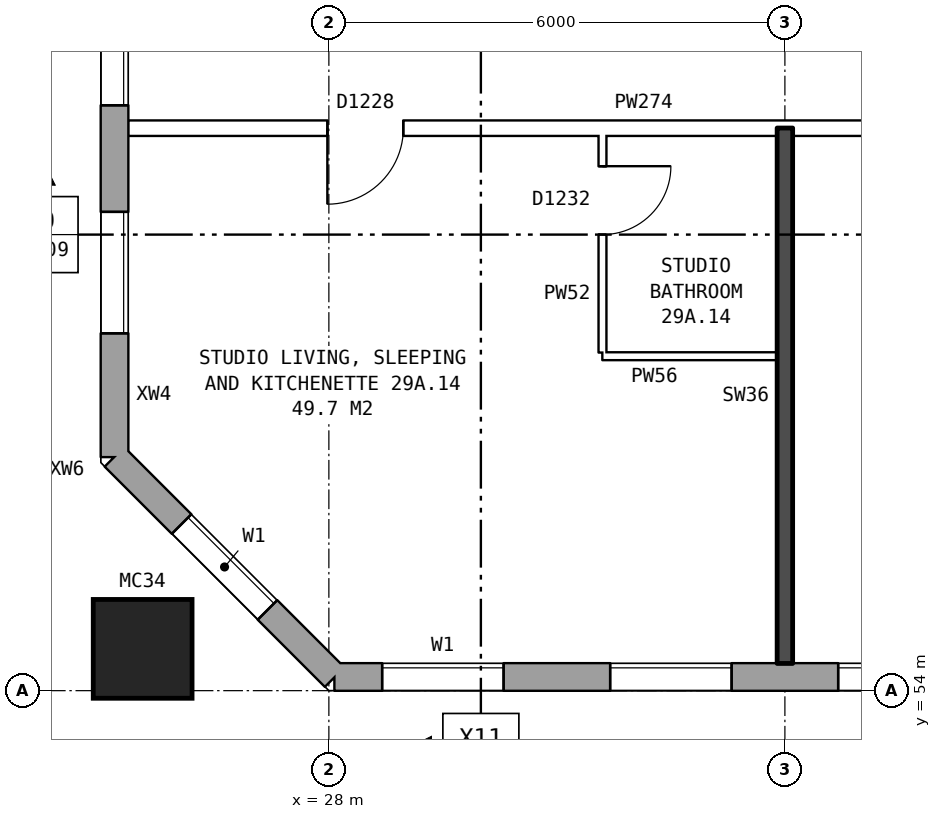
"""IFC4 building model, lengths in metres.
Left out: names, types, materials, properties, quantities, classifications, styles, units other than length and angle.
Written with IfcOpenShell. Run it as: python <this file> out.ifc"""

import sys

from ifc_helpers import new_model, si_unit, direction, frame, frame_2d, origin, origin_2d, place, context, subcontext, project, spatial, rectangle, hollow_rectangle, extrude, element, fill, save


model = new_model("IFC4")
c1 = context("Model", 3, precision=1e-05, world=origin(), true_north=direction((0.0, 1.0)))
c2 = subcontext(c1, "Body", "Model", "MODEL_VIEW")
j1 = project(units=[si_unit("LENGTHUNIT", "METRE"), si_unit("PLANEANGLEUNIT", "RADIAN")], contexts=[c1])
p1 = place(None, origin())
s1 = spatial("IfcSite", under=j1, at=p1, CompositionType="ELEMENT")
p2 = place(p1, origin())
s2 = spatial("IfcBuilding", under=s1, at=p2, CompositionType="ELEMENT")
p3 = place(p2, frame((0.0, 0.0, 105.7)))
s3 = spatial("IfcBuildingStorey", under=s2, at=p3, CompositionType="ELEMENT", Elevation=105.7)
p4 = place(p3, frame((25.55, 54.55, 0.0), z_axis=(0.0, 0.0, 1.0), x_axis=(1.0, 0.0, 0.0)))
e1 = element("IfcColumn", 1, at=p4, inside=s3, PredefinedType="COLUMN", context=c2, shape_type="SweptSolid", body=[
    extrude(hollow_rectangle(XDim=1.3, YDim=1.3, WallThickness=0.07, at=origin_2d()), origin(), (0.0, 0.0, 1.0), 3.1),
])
p5 = place(p3, frame((25.18, 57.075, 0.0), z_axis=(0.0, 0.0, 1.0), x_axis=(0.707106781187, -0.707106781187, 0.0)))
e2 = element("IfcWall", 2, at=p5, inside=s3, PredefinedType="STANDARD", context=c2, shape_type="SweptSolid", body=[
    extrude(rectangle(XDim=4.094, YDim=0.36, at=frame_2d((2.047, 0.0))), origin(), (0.0, 0.0, 1.0), 2.85),
])
p6 = place(p5, frame((1.247, 0.0, 0.8)))
e3 = element("IfcOpeningElement", 3, at=p6, cuts=e2, PredefinedType="OPENING", context=c2, shape_type="SweptSolid", body=[
    extrude(rectangle(XDim=1.6, YDim=1.8, at=frame_2d((0.8, 0.9))), frame((0.0, 0.19, 0.0), z_axis=(0.0, -1.0, 0.0), x_axis=(1.0, 0.0, 0.0)), (0.0, 0.0, 1.0), 0.38),
])
p7 = place(p3, frame((28.075, 54.18, 0.0), z_axis=(0.0, 0.0, 1.0), x_axis=(1.0, 0.0, 0.0)))
e4 = element("IfcWall", 4, at=p7, inside=s3, PredefinedType="STANDARD", context=c2, shape_type="SweptSolid", body=[
    extrude(rectangle(XDim=44.851, YDim=0.36, at=frame_2d((22.425, 0.0))), origin(), (0.0, 0.0, 1.0), 2.85),
])
p8 = place(p7, frame((0.625, 0.0, 0.8)))
e5 = element("IfcOpeningElement", 5, at=p8, cuts=e4, PredefinedType="OPENING", context=c2, shape_type="SweptSolid", body=[
    extrude(rectangle(XDim=1.6, YDim=1.8, at=frame_2d((0.8, 0.9))), frame((0.0, 0.19, 0.0), z_axis=(0.0, -1.0, 0.0), x_axis=(1.0, 0.0, 0.0)), (0.0, 0.0, 1.0), 0.38),
])
p9 = place(p7, frame((3.625, 0.0, 0.8)))
e6 = element("IfcOpeningElement", 6, at=p9, cuts=e4, PredefinedType="OPENING", context=c2, shape_type="SweptSolid", body=[
    extrude(rectangle(XDim=1.6, YDim=1.8, at=frame_2d((0.8, 0.9))), frame((0.0, 0.19, 0.0), z_axis=(0.0, -1.0, 0.0), x_axis=(1.0, 0.0, 0.0)), (0.0, 0.0, 1.0), 0.38),
])
p10 = place(p7, frame((6.625, 0.0, 0.8)))
e7 = element("IfcOpeningElement", 7, at=p10, cuts=e4, PredefinedType="OPENING", context=c2, shape_type="SweptSolid", body=[
    extrude(rectangle(XDim=1.6, YDim=1.8, at=frame_2d((0.8, 0.9))), frame((0.0, 0.19, 0.0), z_axis=(0.0, -1.0, 0.0), x_axis=(1.0, 0.0, 0.0)), (0.0, 0.0, 1.0), 0.38),
])
p11 = place(p7, frame((8.525, 0.0, 0.8)))
e8 = element("IfcOpeningElement", 8, at=p11, cuts=e4, PredefinedType="OPENING", context=c2, shape_type="SweptSolid", body=[
    extrude(rectangle(XDim=1.4, YDim=1.8, at=frame_2d((0.7, 0.9))), frame((0.0, 0.19, 0.0), z_axis=(0.0, -1.0, 0.0), x_axis=(1.0, 0.0, 0.0)), (0.0, 0.0, 1.0), 0.38),
])
p12 = place(p7, frame((13.175, 0.0, 0.8)))
e9 = element("IfcOpeningElement", 9, at=p12, cuts=e4, PredefinedType="OPENING", context=c2, shape_type="SweptSolid", body=[
    extrude(rectangle(XDim=1.0, YDim=0.9, at=frame_2d((0.5, 0.45))), frame((0.0, 0.19, 0.0), z_axis=(0.0, -1.0, 0.0), x_axis=(1.0, 0.0, 0.0)), (0.0, 0.0, 1.0), 0.38),
])
p13 = place(p7, frame((15.625, 0.0, 0.8)))
e10 = element("IfcOpeningElement", 10, at=p13, cuts=e4, PredefinedType="OPENING", context=c2, shape_type="SweptSolid", body=[
    extrude(rectangle(XDim=1.6, YDim=1.8, at=frame_2d((0.8, 0.9))), frame((0.0, 0.19, 0.0), z_axis=(0.0, -1.0, 0.0), x_axis=(1.0, 0.0, 0.0)), (0.0, 0.0, 1.0), 0.38),
])
p14 = place(p7, frame((18.625, 0.0, 0.8)))
e11 = element("IfcOpeningElement", 11, at=p14, cuts=e4, PredefinedType="OPENING", context=c2, shape_type="SweptSolid", body=[
    extrude(rectangle(XDim=1.6, YDim=1.8, at=frame_2d((0.8, 0.9))), frame((0.0, 0.19, 0.0), z_axis=(0.0, -1.0, 0.0), x_axis=(1.0, 0.0, 0.0)), (0.0, 0.0, 1.0), 0.38),
])
p15 = place(p7, frame((21.625, 0.0, 0.8)))
e12 = element("IfcOpeningElement", 12, at=p15, cuts=e4, PredefinedType="OPENING", context=c2, shape_type="SweptSolid", body=[
    extrude(rectangle(XDim=1.6, YDim=1.8, at=frame_2d((0.8, 0.9))), frame((0.0, 0.19, 0.0), z_axis=(0.0, -1.0, 0.0), x_axis=(1.0, 0.0, 0.0)), (0.0, 0.0, 1.0), 0.38),
])
p16 = place(p7, frame((24.625, 0.0, 0.8)))
e13 = element("IfcOpeningElement", 13, at=p16, cuts=e4, PredefinedType="OPENING", context=c2, shape_type="SweptSolid", body=[
    extrude(rectangle(XDim=1.6, YDim=1.8, at=frame_2d((0.8, 0.9))), frame((0.0, 0.19, 0.0), z_axis=(0.0, -1.0, 0.0), x_axis=(1.0, 0.0, 0.0)), (0.0, 0.0, 1.0), 0.38),
])
p17 = place(p7, frame((27.625, 0.0, 0.8)))
e14 = element("IfcOpeningElement", 14, at=p17, cuts=e4, PredefinedType="OPENING", context=c2, shape_type="SweptSolid", body=[
    extrude(rectangle(XDim=1.6, YDim=1.8, at=frame_2d((0.8, 0.9))), frame((0.0, 0.19, 0.0), z_axis=(0.0, -1.0, 0.0), x_axis=(1.0, 0.0, 0.0)), (0.0, 0.0, 1.0), 0.38),
])
p18 = place(p7, frame((30.125, 0.0, 0.15)))
e15 = element("IfcOpeningElement", 15, at=p18, cuts=e4, PredefinedType="OPENING", context=c2, shape_type="SweptSolid", body=[
    extrude(rectangle(XDim=1.2, YDim=1.8, at=frame_2d((0.6, 0.9))), frame((0.0, 0.19, 0.0), z_axis=(0.0, -1.0, 0.0), x_axis=(1.0, 0.0, 0.0)), (0.0, 0.0, 1.0), 0.38),
])
p19 = place(p7, frame((33.075, 0.0, 1.6)))
e16 = element("IfcOpeningElement", 16, at=p19, cuts=e4, PredefinedType="OPENING", context=c2, shape_type="SweptSolid", body=[
    extrude(rectangle(XDim=0.6, YDim=0.9, at=frame_2d((0.3, 0.45))), frame((0.0, 0.19, 0.0), z_axis=(0.0, -1.0, 0.0), x_axis=(1.0, 0.0, 0.0)), (0.0, 0.0, 1.0), 0.38),
])
p20 = place(p7, frame((36.625, 0.0, 0.8)))
e17 = element("IfcOpeningElement", 17, at=p20, cuts=e4, PredefinedType="OPENING", context=c2, shape_type="SweptSolid", body=[
    extrude(rectangle(XDim=1.6, YDim=1.8, at=frame_2d((0.8, 0.9))), frame((0.0, 0.19, 0.0), z_axis=(0.0, -1.0, 0.0), x_axis=(1.0, 0.0, 0.0)), (0.0, 0.0, 1.0), 0.38),
])
p21 = place(p7, frame((39.625, 0.0, 0.8)))
e18 = element("IfcOpeningElement", 18, at=p21, cuts=e4, PredefinedType="OPENING", context=c2, shape_type="SweptSolid", body=[
    extrude(rectangle(XDim=1.6, YDim=1.8, at=frame_2d((0.8, 0.9))), frame((0.0, 0.19, 0.0), z_axis=(0.0, -1.0, 0.0), x_axis=(1.0, 0.0, 0.0)), (0.0, 0.0, 1.0), 0.38),
])
p22 = place(p7, frame((42.625, 0.0, 0.8)))
e19 = element("IfcOpeningElement", 19, at=p22, cuts=e4, PredefinedType="OPENING", context=c2, shape_type="SweptSolid", body=[
    extrude(rectangle(XDim=1.6, YDim=1.8, at=frame_2d((0.8, 0.9))), frame((0.0, 0.19, 0.0), z_axis=(0.0, -1.0, 0.0), x_axis=(1.0, 0.0, 0.0)), (0.0, 0.0, 1.0), 0.38),
])
p23 = place(p7, frame((10.225, 0.0, 1.1)))
e20 = element("IfcOpeningElement", 20, at=p23, cuts=e4, PredefinedType="OPENING", context=c2, shape_type="SweptSolid", body=[
    extrude(rectangle(XDim=0.8, YDim=1.5, at=frame_2d((0.4, 0.75))), frame((0.0, 0.19, 0.0), z_axis=(0.0, -1.0, 0.0), x_axis=(1.0, 0.0, 0.0)), (0.0, 0.0, 1.0), 0.38),
])
p24 = place(p7, frame((14.475, 0.0, 0.8)))
e21 = element("IfcOpeningElement", 21, at=p24, cuts=e4, PredefinedType="OPENING", context=c2, shape_type="SweptSolid", body=[
    extrude(rectangle(XDim=0.8, YDim=1.8, at=frame_2d((0.4, 0.9))), frame((0.0, 0.19, 0.0), z_axis=(0.0, -1.0, 0.0), x_axis=(1.0, 0.0, 0.0)), (0.0, 0.0, 1.0), 0.38),
])
p25 = place(p7, frame((31.625, 0.0, 0.25)))
e22 = element("IfcOpeningElement", 22, at=p25, cuts=e4, PredefinedType="OPENING", context=c2, shape_type="SweptSolid", body=[
    extrude(rectangle(XDim=0.8, YDim=0.9, at=frame_2d((0.4, 0.45))), frame((0.0, 0.19, 0.0), z_axis=(0.0, -1.0, 0.0), x_axis=(1.0, 0.0, 0.0)), (0.0, 0.0, 1.0), 0.38),
])
p26 = place(p7, frame((34.125, 0.0, 0.8)))
e23 = element("IfcOpeningElement", 23, at=p26, cuts=e4, PredefinedType="OPENING", context=c2, shape_type="SweptSolid", body=[
    extrude(rectangle(XDim=1.6, YDim=1.8, at=frame_2d((0.8, 0.9))), frame((0.0, 0.19, 0.0), z_axis=(0.0, -1.0, 0.0), x_axis=(1.0, 0.0, 0.0)), (0.0, 0.0, 1.0), 0.38),
])
p27 = place(p3, frame((25.18, 82.925, 0.0), z_axis=(0.0, 0.0, 1.0), x_axis=(0.0, -1.0, 0.0)))
e24 = element("IfcWall", 24, at=p27, inside=s3, PredefinedType="STANDARD", context=c2, shape_type="SweptSolid", body=[
    extrude(rectangle(XDim=25.851, YDim=0.36, at=frame_2d((12.925, 0.0))), origin(), (0.0, 0.0, 1.0), 2.85),
])
p28 = place(p27, frame((1.625, 0.0, 0.8)))
e25 = element("IfcOpeningElement", 25, at=p28, cuts=e24, PredefinedType="OPENING", context=c2, shape_type="SweptSolid", body=[
    extrude(rectangle(XDim=1.6, YDim=1.8, at=frame_2d((0.8, 0.9))), frame((0.0, 0.19, 0.0), z_axis=(0.0, -1.0, 0.0), x_axis=(1.0, 0.0, 0.0)), (0.0, 0.0, 1.0), 0.38),
])
p29 = place(p27, frame((4.625, 0.0, 0.8)))
e26 = element("IfcOpeningElement", 26, at=p29, cuts=e24, PredefinedType="OPENING", context=c2, shape_type="SweptSolid", body=[
    extrude(rectangle(XDim=1.6, YDim=1.8, at=frame_2d((0.8, 0.9))), frame((0.0, 0.19, 0.0), z_axis=(0.0, -1.0, 0.0), x_axis=(1.0, 0.0, 0.0)), (0.0, 0.0, 1.0), 0.38),
])
p30 = place(p27, frame((6.525, 0.0, 0.8)))
e27 = element("IfcOpeningElement", 27, at=p30, cuts=e24, PredefinedType="OPENING", context=c2, shape_type="SweptSolid", body=[
    extrude(rectangle(XDim=1.6, YDim=1.5, at=frame_2d((0.8, 0.75))), frame((0.0, 0.19, 0.0), z_axis=(0.0, -1.0, 0.0), x_axis=(1.0, 0.0, 0.0)), (0.0, 0.0, 1.0), 0.38),
])
p31 = place(p27, frame((8.425, 0.0, 0.8)))
e28 = element("IfcOpeningElement", 28, at=p31, cuts=e24, PredefinedType="OPENING", context=c2, shape_type="SweptSolid", body=[
    extrude(rectangle(XDim=0.6, YDim=0.9, at=frame_2d((0.3, 0.45))), frame((0.0, 0.19, 0.0), z_axis=(0.0, -1.0, 0.0), x_axis=(1.0, 0.0, 0.0)), (0.0, 0.0, 1.0), 0.38),
])
p32 = place(p27, frame((10.275, 0.0, 1.7)))
e29 = element("IfcOpeningElement", 29, at=p32, cuts=e24, PredefinedType="OPENING", context=c2, shape_type="SweptSolid", body=[
    extrude(rectangle(XDim=0.8, YDim=0.9, at=frame_2d((0.4, 0.45))), frame((0.0, 0.19, 0.0), z_axis=(0.0, -1.0, 0.0), x_axis=(1.0, 0.0, 0.0)), (0.0, 0.0, 1.0), 0.38),
])
p33 = place(p27, frame((11.375, 0.0, 1.1)))
e30 = element("IfcOpeningElement", 30, at=p33, cuts=e24, PredefinedType="OPENING", context=c2, shape_type="SweptSolid", body=[
    extrude(rectangle(XDim=0.8, YDim=1.5, at=frame_2d((0.4, 0.75))), frame((0.0, 0.19, 0.0), z_axis=(0.0, -1.0, 0.0), x_axis=(1.0, 0.0, 0.0)), (0.0, 0.0, 1.0), 0.38),
])
p34 = place(p27, frame((19.625, 0.0, 0.8)))
e31 = element("IfcOpeningElement", 31, at=p34, cuts=e24, PredefinedType="OPENING", context=c2, shape_type="SweptSolid", body=[
    extrude(rectangle(XDim=1.6, YDim=1.8, at=frame_2d((0.8, 0.9))), frame((0.0, 0.19, 0.0), z_axis=(0.0, -1.0, 0.0), x_axis=(1.0, 0.0, 0.0)), (0.0, 0.0, 1.0), 0.38),
])
p35 = place(p27, frame((22.625, 0.0, 0.8)))
e32 = element("IfcOpeningElement", 32, at=p35, cuts=e24, PredefinedType="OPENING", context=c2, shape_type="SweptSolid", body=[
    extrude(rectangle(XDim=1.6, YDim=1.8, at=frame_2d((0.8, 0.9))), frame((0.0, 0.19, 0.0), z_axis=(0.0, -1.0, 0.0), x_axis=(1.0, 0.0, 0.0)), (0.0, 0.0, 1.0), 0.38),
])
p36 = place(p27, frame((12.475, 0.0, 0.8)))
e33 = element("IfcOpeningElement", 33, at=p36, cuts=e24, PredefinedType="OPENING", context=c2, shape_type="SweptSolid", body=[
    extrude(rectangle(XDim=1.6, YDim=1.8, at=frame_2d((0.8, 0.9))), frame((0.0, 0.19, 0.0), z_axis=(0.0, -1.0, 0.0), x_axis=(1.0, 0.0, 0.0)), (0.0, 0.0, 1.0), 0.38),
])
p37 = place(p27, frame((14.375, 0.0, 1.7)))
e34 = element("IfcOpeningElement", 34, at=p37, cuts=e24, PredefinedType="OPENING", context=c2, shape_type="SweptSolid", body=[
    extrude(rectangle(XDim=1.2, YDim=0.9, at=frame_2d((0.6, 0.45))), frame((0.0, 0.19, 0.0), z_axis=(0.0, -1.0, 0.0), x_axis=(1.0, 0.0, 0.0)), (0.0, 0.0, 1.0), 0.38),
])
p38 = place(p27, frame((16.725, 0.0, 0.8)))
e35 = element("IfcOpeningElement", 35, at=p38, cuts=e24, PredefinedType="OPENING", context=c2, shape_type="SweptSolid", body=[
    extrude(rectangle(XDim=0.6, YDim=0.9, at=frame_2d((0.3, 0.45))), frame((0.0, 0.19, 0.0), z_axis=(0.0, -1.0, 0.0), x_axis=(1.0, 0.0, 0.0)), (0.0, 0.0, 1.0), 0.38),
])
p39 = place(p27, frame((17.725, 0.0, 0.8)))
e36 = element("IfcOpeningElement", 36, at=p39, cuts=e24, PredefinedType="OPENING", context=c2, shape_type="SweptSolid", body=[
    extrude(rectangle(XDim=1.6, YDim=1.5, at=frame_2d((0.8, 0.75))), frame((0.0, 0.19, 0.0), z_axis=(0.0, -1.0, 0.0), x_axis=(1.0, 0.0, 0.0)), (0.0, 0.0, 1.0), 0.38),
])
p40 = place(p3, frame((31.6, 58.4, 0.0), z_axis=(0.0, 0.0, 1.0), x_axis=(1.0, 0.0, 0.0)))
e37 = element("IfcWall", 37, at=p40, inside=s3, PredefinedType="PARTITIONING", context=c2, shape_type="SweptSolid", body=[
    extrude(rectangle(XDim=2.3, YDim=0.1, at=frame_2d((1.15, 0.0))), origin(), (0.0, 0.0, 1.0), 2.85),
])
p41 = place(p3, frame((25.36, 61.4, 0.0), z_axis=(0.0, 0.0, 1.0), x_axis=(1.0, 0.0, 0.0)))
e38 = element("IfcWall", 38, at=p41, inside=s3, PredefinedType="PARTITIONING", context=c2, shape_type="SweptSolid", body=[
    extrude(rectangle(XDim=20.54, YDim=0.2, at=frame_2d((10.27, 0.0))), origin(), (0.0, 0.0, 1.0), 2.85),
])
p42 = place(p41, frame((15.94, 0.0, 0.0)))
e39 = element("IfcOpeningElement", 39, at=p42, cuts=e38, PredefinedType="OPENING", context=c2, shape_type="SweptSolid", body=[
    extrude(rectangle(XDim=1.0, YDim=2.1, at=frame_2d((0.5, 1.05))), frame((0.0, 0.11, 0.0), z_axis=(0.0, -1.0, 0.0), x_axis=(1.0, 0.0, 0.0)), (0.0, 0.0, 1.0), 0.22),
])
p43 = place(p41, frame((9.94, 0.0, 0.0)))
e40 = element("IfcOpeningElement", 40, at=p43, cuts=e38, PredefinedType="OPENING", context=c2, shape_type="SweptSolid", body=[
    extrude(rectangle(XDim=1.0, YDim=2.1, at=frame_2d((0.5, 1.05))), frame((0.0, 0.11, 0.0), z_axis=(0.0, -1.0, 0.0), x_axis=(1.0, 0.0, 0.0)), (0.0, 0.0, 1.0), 0.22),
])
p44 = place(p41, frame((2.62, 0.0, 0.0)))
e41 = element("IfcOpeningElement", 41, at=p44, cuts=e38, PredefinedType="OPENING", context=c2, shape_type="SweptSolid", body=[
    extrude(rectangle(XDim=1.0, YDim=2.1, at=frame_2d((0.5, 1.05))), frame((0.0, 0.11, 0.0), z_axis=(0.0, -1.0, 0.0), x_axis=(1.0, 0.0, 0.0)), (0.0, 0.0, 1.0), 0.22),
])
p45 = place(p3, frame((31.6, 58.45, 0.0), z_axis=(0.0, 0.0, 1.0), x_axis=(0.0, 1.0, 0.0)))
e42 = element("IfcWall", 42, at=p45, inside=s3, PredefinedType="PARTITIONING", context=c2, shape_type="SweptSolid", body=[
    extrude(rectangle(XDim=2.85, YDim=0.1, at=frame_2d((1.425, 0.0))), origin(), (0.0, 0.0, 1.0), 2.85),
])
p46 = place(p45, frame((1.55, 0.0, 0.0)))
e43 = element("IfcOpeningElement", 43, at=p46, cuts=e42, PredefinedType="OPENING", context=c2, shape_type="SweptSolid", body=[
    extrude(rectangle(XDim=0.9, YDim=2.1, at=frame_2d((0.45, 1.05))), frame((0.0, 0.06, 0.0), z_axis=(0.0, -1.0, 0.0), x_axis=(1.0, 0.0, 0.0)), (0.0, 0.0, 1.0), 0.12),
])
p47 = place(p3, frame((34.0, 54.36, 0.0), z_axis=(0.0, 0.0, 1.0), x_axis=(0.0, 1.0, 0.0)))
e44 = element("IfcWall", 44, at=p47, inside=s3, PredefinedType="SOLIDWALL", context=c2, shape_type="SweptSolid", body=[
    extrude(rectangle(XDim=7.04, YDim=0.2, at=frame_2d((3.52, 0.0))), origin(), (0.0, 0.0, 1.0), 2.85),
])
p48 = place(p6, origin())
e45 = element("IfcWindow", 45, at=p48, inside=s3, PartitioningType="SINGLE_PANEL", PredefinedType="WINDOW", context=c2, shape_type="SweptSolid", body=[
    extrude(rectangle(XDim=1.6, YDim=1.8, at=frame_2d((0.8, 0.9))), frame((0.0, 0.15, 0.0), z_axis=(0.0, -1.0, 0.0), x_axis=(1.0, 0.0, 0.0)), (0.0, 0.0, 1.0), 0.06),
])
fill(e3, e45)
p49 = place(p8, origin())
e46 = element("IfcWindow", 46, at=p49, inside=s3, PartitioningType="SINGLE_PANEL", PredefinedType="WINDOW", context=c2, shape_type="SweptSolid", body=[
    extrude(rectangle(XDim=1.6, YDim=1.8, at=frame_2d((0.8, 0.9))), frame((0.0, 0.15, 0.0), z_axis=(0.0, -1.0, 0.0), x_axis=(1.0, 0.0, 0.0)), (0.0, 0.0, 1.0), 0.06),
])
fill(e5, e46)
p50 = place(p9, origin())
e47 = element("IfcWindow", 47, at=p50, inside=s3, PartitioningType="SINGLE_PANEL", PredefinedType="WINDOW", context=c2, shape_type="SweptSolid", body=[
    extrude(rectangle(XDim=1.6, YDim=1.8, at=frame_2d((0.8, 0.9))), frame((0.0, 0.15, 0.0), z_axis=(0.0, -1.0, 0.0), x_axis=(1.0, 0.0, 0.0)), (0.0, 0.0, 1.0), 0.06),
])
fill(e6, e47)
p51 = place(p10, origin())
e48 = element("IfcWindow", 48, at=p51, inside=s3, PartitioningType="SINGLE_PANEL", PredefinedType="WINDOW", context=c2, shape_type="SweptSolid", body=[
    extrude(rectangle(XDim=1.6, YDim=1.8, at=frame_2d((0.8, 0.9))), frame((0.0, 0.15, 0.0), z_axis=(0.0, -1.0, 0.0), x_axis=(1.0, 0.0, 0.0)), (0.0, 0.0, 1.0), 0.06),
])
fill(e7, e48)
p52 = place(p34, origin())
e49 = element("IfcWindow", 49, at=p52, inside=s3, PartitioningType="SINGLE_PANEL", PredefinedType="WINDOW", context=c2, shape_type="SweptSolid", body=[
    extrude(rectangle(XDim=1.6, YDim=1.8, at=frame_2d((0.8, 0.9))), frame((0.0, 0.15, 0.0), z_axis=(0.0, -1.0, 0.0), x_axis=(1.0, 0.0, 0.0)), (0.0, 0.0, 1.0), 0.06),
])
fill(e31, e49)
p53 = place(p35, origin())
e50 = element("IfcWindow", 50, at=p53, inside=s3, PartitioningType="SINGLE_PANEL", PredefinedType="WINDOW", context=c2, shape_type="SweptSolid", body=[
    extrude(rectangle(XDim=1.6, YDim=1.8, at=frame_2d((0.8, 0.9))), frame((0.0, 0.15, 0.0), z_axis=(0.0, -1.0, 0.0), x_axis=(1.0, 0.0, 0.0)), (0.0, 0.0, 1.0), 0.06),
])
fill(e32, e50)
p54 = place(p44, frame((1.0, 0.0, 0.0), z_axis=(0.0, 0.0, 1.0), x_axis=(-1.0, 0.0, 0.0)))
e51 = element("IfcDoor", 51, at=p54, inside=s3, OperationType="SINGLE_SWING_RIGHT", PredefinedType="DOOR", context=c2, shape_type="SweptSolid", body=[
    extrude(rectangle(XDim=1.0, YDim=2.1, at=frame_2d((0.5, 1.05))), frame((0.0, 0.025, 0.0), z_axis=(0.0, -1.0, 0.0), x_axis=(1.0, 0.0, 0.0)), (0.0, 0.0, 1.0), 0.05),
])
fill(e41, e51)
p55 = place(p46, frame((0.9, 0.0, 0.0), z_axis=(0.0, 0.0, 1.0), x_axis=(-1.0, 0.0, 0.0)))
e52 = element("IfcDoor", 52, at=p55, inside=s3, OperationType="SINGLE_SWING_LEFT", PredefinedType="DOOR", context=c2, shape_type="SweptSolid", body=[
    extrude(rectangle(XDim=0.9, YDim=2.1, at=frame_2d((0.45, 1.05))), frame((0.0, 0.025, 0.0), z_axis=(0.0, -1.0, 0.0), x_axis=(1.0, 0.0, 0.0)), (0.0, 0.0, 1.0), 0.05),
])
fill(e43, e52)
save(model, sys.argv[1])
